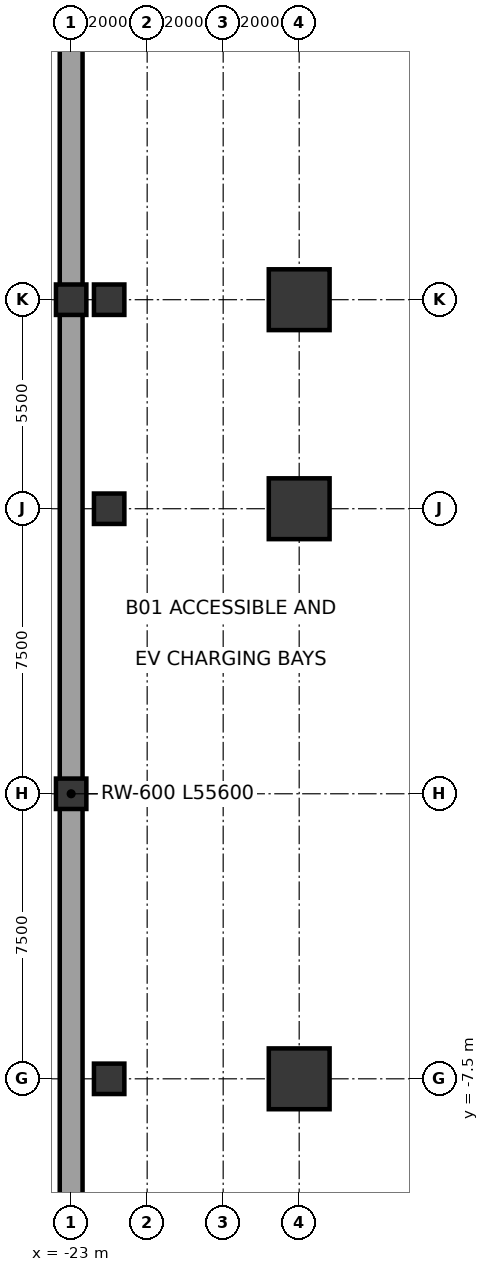
"""IFC4 building model, lengths in metres.
Left out: names, types, materials, properties, quantities, classifications, styles, units other than length and angle.
Written with IfcOpenShell. Run it as: python <this file> out.ifc"""

import sys

from ifc_helpers import new_model, si_unit, direction, frame, frame_2d, origin, origin_2d, place, context, subcontext, project, spatial, rectangle, extrude, element, save


model = new_model("IFC4")
c1 = context("Model", 3, precision=1e-05, world=origin(), true_north=direction((0.0, 1.0)))
c2 = subcontext(c1, "Body", "Model", "MODEL_VIEW")
j1 = project(units=[si_unit("LENGTHUNIT", "METRE"), si_unit("PLANEANGLEUNIT", "RADIAN")], contexts=[c1])
p1 = place(None, origin())
s1 = spatial("IfcSite", under=j1, at=p1, CompositionType="ELEMENT")
p2 = place(p1, origin())
s2 = spatial("IfcBuilding", under=s1, at=p2, CompositionType="ELEMENT")
p3 = place(p2, frame((0.0, 0.0, -3.6)))
s3 = spatial("IfcBuildingStorey", under=s2, at=p3, CompositionType="ELEMENT", Elevation=-3.6)
p4 = place(p3, frame((-23.0, 27.8, 0.0), z_axis=(0.0, 0.0, 1.0), x_axis=(0.0, -1.0, 0.0)))
e1 = element("IfcWall", 1, at=p4, inside=s3, PredefinedType="USERDEFINED", context=c2, shape_type="SweptSolid", body=[
    extrude(rectangle(XDim=55.6, YDim=0.6, at=frame_2d((27.8, 0.0))), origin(), (0.0, 0.0, 1.0), 3.6),
])
for number, where, z_axis, x_axis in (
    (2, (-17.0, 13.0, 0.0), (0.0, 0.0, 1.0), (1.0, 0.0, 0.0)),
    (3, (-17.0, 7.5, 0.0), (0.0, 0.0, 1.0), (1.0, 0.0, 0.0)),
    (4, (-17.0, -7.5, 0.0), (0.0, 0.0, 1.0), (1.0, 0.0, 0.0)),
):
    element("IfcColumn", number, at=place(p3, frame(where, z_axis=z_axis, x_axis=x_axis)), inside=s3, PredefinedType="USERDEFINED", context=c2, shape_type="SweptSolid", body=[
        extrude(rectangle(XDim=1.6, YDim=1.6, at=origin_2d()), origin(), (0.0, 0.0, 1.0), 3.6),
    ])
for number, where, z_axis, x_axis in (
    (5, (-23.0, 0.0, 0.0), (0.0, 0.0, 1.0), (1.0, 0.0, 0.0)),
    (6, (-23.0, 13.0, 0.0), (0.0, 0.0, 1.0), (1.0, 0.0, 0.0)),
    (7, (-22.0, -7.5, 0.0), (0.0, 0.0, 1.0), (1.0, 0.0, 0.0)),
    (8, (-22.0, 7.5, 0.0), (0.0, 0.0, 1.0), (1.0, 0.0, 0.0)),
    (9, (-22.0, 13.0, 0.0), (0.0, 0.0, 1.0), (1.0, 0.0, 0.0)),
):
    element("IfcColumn", number, at=place(p3, frame(where, z_axis=z_axis, x_axis=x_axis)), inside=s3, PredefinedType="COLUMN", context=c2, shape_type="SweptSolid", body=[
        extrude(rectangle(XDim=0.8, YDim=0.8, at=origin_2d()), origin(), (0.0, 0.0, 1.0), 3.6),
    ])
save(model, sys.argv[1])
